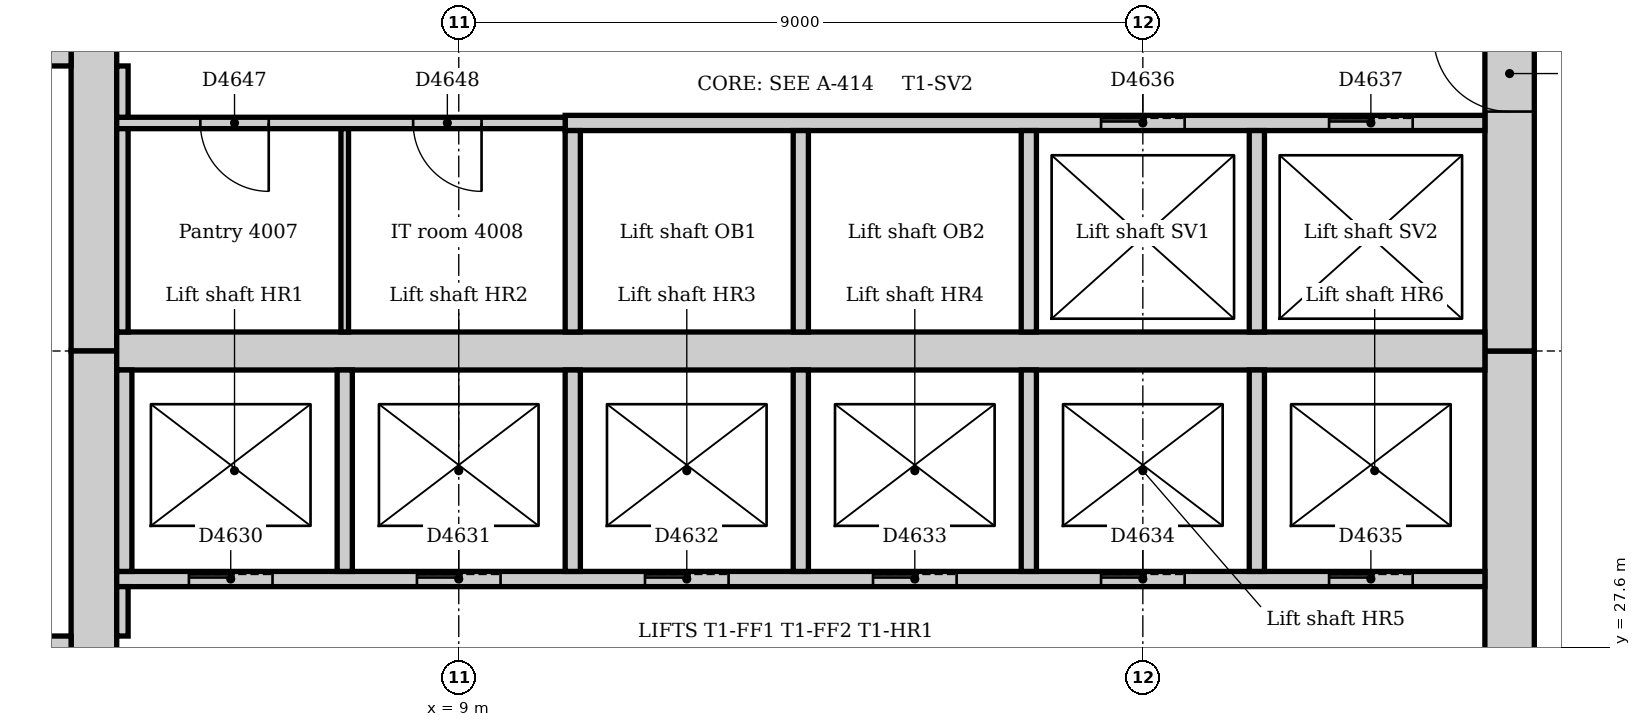
"""IFC4 building model, lengths in metres.
Left out: names, types, materials, properties, quantities, classifications, styles, units other than length and angle.
Written with IfcOpenShell. Run it as: python <this file> out.ifc"""

import sys

from ifc_helpers import new_model, si_unit, direction, frame, frame_2d, origin, place, context, subcontext, project, spatial, rectangle, extrude, element, fill, save


model = new_model("IFC4")
c1 = context("Model", 3, precision=1e-05, world=origin(), true_north=direction((0.0, 1.0)))
c2 = subcontext(c1, "Body", "Model", "MODEL_VIEW")
j1 = project(units=[si_unit("LENGTHUNIT", "METRE"), si_unit("PLANEANGLEUNIT", "RADIAN")], contexts=[c1])
p1 = place(None, origin())
s1 = spatial("IfcSite", under=j1, at=p1, CompositionType="ELEMENT")
p2 = place(p1, origin())
s2 = spatial("IfcBuilding", under=s1, at=p2, CompositionType="ELEMENT")
p3 = place(p2, frame((0.0, 0.0, 169.0)))
s3 = spatial("IfcBuildingStorey", under=s2, at=p3, CompositionType="ELEMENT", Elevation=169.0)
p4 = place(p3, frame((22.825, 21.0, 0.0), z_axis=(0.0, 0.0, 1.0), x_axis=(0.0, 1.0, 0.0)))
e1 = element("IfcWall", 1, at=p4, inside=s3, PredefinedType="SOLIDWALL", context=c2, shape_type="SweptSolid", body=[
    extrude(rectangle(XDim=10.5, YDim=0.65, at=frame_2d((5.25, 0.0))), origin(), (0.0, 0.0, 1.0), 4.0),
])
p5 = place(p4, frame((4.35, 0.0, 0.0)))
e2 = element("IfcOpeningElement", 2, at=p5, cuts=e1, PredefinedType="OPENING", context=c2, shape_type="SweptSolid", body=[
    extrude(rectangle(XDim=1.8, YDim=2.1, at=frame_2d((0.9, 1.05))), frame((0.0, 0.335, 0.0), z_axis=(0.0, -1.0, 0.0), x_axis=(1.0, 0.0, 0.0)), (0.0, 0.0, 1.0), 0.67),
])
p6 = place(p3, frame((22.825, 31.5, 0.0), z_axis=(0.0, 0.0, 1.0), x_axis=(0.0, 1.0, 0.0)))
e3 = element("IfcWall", 3, at=p6, inside=s3, PredefinedType="SOLIDWALL", context=c2, shape_type="SweptSolid", body=[
    extrude(rectangle(XDim=10.5, YDim=0.65, at=frame_2d((5.25, 0.0))), origin(), (0.0, 0.0, 1.0), 4.0),
])
p7 = place(p6, frame((3.15, 0.0, 0.0)))
e4 = element("IfcOpeningElement", 4, at=p7, cuts=e3, PredefinedType="OPENING", context=c2, shape_type="SweptSolid", body=[
    extrude(rectangle(XDim=1.0, YDim=2.1, at=frame_2d((0.5, 1.05))), frame((0.0, 0.335, 0.0), z_axis=(0.0, -1.0, 0.0), x_axis=(1.0, 0.0, 0.0)), (0.0, 0.0, 1.0), 0.67),
])
p8 = place(p6, frame((5.2, 0.0, 0.0)))
e5 = element("IfcOpeningElement", 5, at=p8, cuts=e3, PredefinedType="OPENING", context=c2, shape_type="SweptSolid", body=[
    extrude(rectangle(XDim=1.0, YDim=2.1, at=frame_2d((0.5, 1.05))), frame((0.0, 0.335, 0.0), z_axis=(0.0, -1.0, 0.0), x_axis=(1.0, 0.0, 0.0)), (0.0, 0.0, 1.0), 0.67),
])
p9 = place(p3, frame((4.2, 42.0, 0.0), z_axis=(0.0, 0.0, 1.0), x_axis=(0.0, -1.0, 0.0)))
e6 = element("IfcWall", 6, at=p9, inside=s3, PredefinedType="SOLIDWALL", context=c2, shape_type="SweptSolid", body=[
    extrude(rectangle(XDim=10.5, YDim=0.6, at=frame_2d((5.25, 0.0))), origin(), (0.0, 0.0, 1.0), 4.0),
])
p10 = place(p9, frame((5.3, 0.0, 0.0)))
e7 = element("IfcOpeningElement", 7, at=p10, cuts=e6, PredefinedType="OPENING", context=c2, shape_type="SweptSolid", body=[
    extrude(rectangle(XDim=1.0, YDim=2.1, at=frame_2d((0.5, 1.05))), frame((0.0, 0.31, 0.0), z_axis=(0.0, -1.0, 0.0), x_axis=(1.0, 0.0, 0.0)), (0.0, 0.0, 1.0), 0.62),
])
p11 = place(p3, frame((4.2, 31.5, 0.0), z_axis=(0.0, 0.0, 1.0), x_axis=(0.0, -1.0, 0.0)))
e8 = element("IfcWall", 8, at=p11, inside=s3, PredefinedType="SOLIDWALL", context=c2, shape_type="SweptSolid", body=[
    extrude(rectangle(XDim=10.5, YDim=0.6, at=frame_2d((5.25, 0.0))), origin(), (0.0, 0.0, 1.0), 4.0),
])
p12 = place(p11, frame((4.25, 0.0, 0.0)))
e9 = element("IfcOpeningElement", 9, at=p12, cuts=e8, PredefinedType="OPENING", context=c2, shape_type="SweptSolid", body=[
    extrude(rectangle(XDim=1.0, YDim=2.1, at=frame_2d((0.5, 1.05))), frame((0.0, 0.31, 0.0), z_axis=(0.0, -1.0, 0.0), x_axis=(1.0, 0.0, 0.0)), (0.0, 0.0, 1.0), 0.62),
])
p13 = place(p3, frame((4.5, 31.5, 0.0), z_axis=(0.0, 0.0, 1.0), x_axis=(1.0, 0.0, 0.0)))
e10 = element("IfcWall", 10, at=p13, inside=s3, PredefinedType="SOLIDWALL", context=c2, shape_type="SweptSolid", body=[
    extrude(rectangle(XDim=18.0, YDim=0.5, at=frame_2d((9.0, 0.0))), origin(), (0.0, 0.0, 1.0), 4.0),
])
p14 = place(p3, frame((3.9, 27.625, 0.0), z_axis=(0.0, 0.0, 1.0), x_axis=(-1.0, 0.0, 0.0)))
e11 = element("IfcWall", 11, at=p14, inside=s3, PredefinedType="SOLIDWALL", context=c2, shape_type="SweptSolid", body=[
    extrude(rectangle(XDim=3.54, YDim=0.25, at=frame_2d((1.77, 0.0))), origin(), (0.0, 0.0, 1.0), 4.0),
])
p15 = place(p14, frame((0.4, 0.0, 0.0)))
e12 = element("IfcOpeningElement", 12, at=p15, cuts=e11, PredefinedType="OPENING", context=c2, shape_type="SweptSolid", body=[
    extrude(rectangle(XDim=1.0, YDim=2.1, at=frame_2d((0.5, 1.05))), frame((0.0, 0.135, 0.0), z_axis=(0.0, -1.0, 0.0), x_axis=(1.0, 0.0, 0.0)), (0.0, 0.0, 1.0), 0.27),
])
p16 = place(p3, frame((0.36, 35.375, 0.0), z_axis=(0.0, 0.0, 1.0), x_axis=(1.0, 0.0, 0.0)))
e13 = element("IfcWall", 13, at=p16, inside=s3, PredefinedType="SOLIDWALL", context=c2, shape_type="SweptSolid", body=[
    extrude(rectangle(XDim=3.54, YDim=0.25, at=frame_2d((1.77, 0.0))), origin(), (0.0, 0.0, 1.0), 4.0),
])
p17 = place(p16, frame((2.14, 0.0, 0.0)))
e14 = element("IfcOpeningElement", 14, at=p17, cuts=e13, PredefinedType="OPENING", context=c2, shape_type="SweptSolid", body=[
    extrude(rectangle(XDim=1.0, YDim=2.1, at=frame_2d((0.5, 1.05))), frame((0.0, 0.135, 0.0), z_axis=(0.0, -1.0, 0.0), x_axis=(1.0, 0.0, 0.0)), (0.0, 0.0, 1.0), 0.27),
])
p18 = place(p3, frame((4.5, 28.5, 0.0), z_axis=(0.0, 0.0, 1.0), x_axis=(1.0, 0.0, 0.0)))
e15 = element("IfcWall", 15, at=p18, inside=s3, PredefinedType="PARTITIONING", context=c2, shape_type="SweptSolid", body=[
    extrude(rectangle(XDim=18.0, YDim=0.2, at=frame_2d((9.0, 0.0))), origin(), (0.0, 0.0, 1.0), 3.85),
])
p19 = place(p18, frame((0.95, 0.0, 0.0)))
e16 = element("IfcOpeningElement", 16, at=p19, cuts=e15, PredefinedType="OPENING", context=c2, shape_type="SweptSolid", body=[
    extrude(rectangle(XDim=1.1, YDim=2.1, at=frame_2d((0.55, 1.05))), frame((0.0, 0.11, 0.0), z_axis=(0.0, -1.0, 0.0), x_axis=(1.0, 0.0, 0.0)), (0.0, 0.0, 1.0), 0.22),
])
p20 = place(p18, frame((3.95, 0.0, 0.0)))
e17 = element("IfcOpeningElement", 17, at=p20, cuts=e15, PredefinedType="OPENING", context=c2, shape_type="SweptSolid", body=[
    extrude(rectangle(XDim=1.1, YDim=2.1, at=frame_2d((0.55, 1.05))), frame((0.0, 0.11, 0.0), z_axis=(0.0, -1.0, 0.0), x_axis=(1.0, 0.0, 0.0)), (0.0, 0.0, 1.0), 0.22),
])
p21 = place(p18, frame((6.95, 0.0, 0.0)))
e18 = element("IfcOpeningElement", 18, at=p21, cuts=e15, PredefinedType="OPENING", context=c2, shape_type="SweptSolid", body=[
    extrude(rectangle(XDim=1.1, YDim=2.1, at=frame_2d((0.55, 1.05))), frame((0.0, 0.11, 0.0), z_axis=(0.0, -1.0, 0.0), x_axis=(1.0, 0.0, 0.0)), (0.0, 0.0, 1.0), 0.22),
])
p22 = place(p18, frame((9.95, 0.0, 0.0)))
e19 = element("IfcOpeningElement", 19, at=p22, cuts=e15, PredefinedType="OPENING", context=c2, shape_type="SweptSolid", body=[
    extrude(rectangle(XDim=1.1, YDim=2.1, at=frame_2d((0.55, 1.05))), frame((0.0, 0.11, 0.0), z_axis=(0.0, -1.0, 0.0), x_axis=(1.0, 0.0, 0.0)), (0.0, 0.0, 1.0), 0.22),
])
p23 = place(p18, frame((12.95, 0.0, 0.0)))
e20 = element("IfcOpeningElement", 20, at=p23, cuts=e15, PredefinedType="OPENING", context=c2, shape_type="SweptSolid", body=[
    extrude(rectangle(XDim=1.1, YDim=2.1, at=frame_2d((0.55, 1.05))), frame((0.0, 0.11, 0.0), z_axis=(0.0, -1.0, 0.0), x_axis=(1.0, 0.0, 0.0)), (0.0, 0.0, 1.0), 0.22),
])
p24 = place(p18, frame((15.95, 0.0, 0.0)))
e21 = element("IfcOpeningElement", 21, at=p24, cuts=e15, PredefinedType="OPENING", context=c2, shape_type="SweptSolid", body=[
    extrude(rectangle(XDim=1.1, YDim=2.1, at=frame_2d((0.55, 1.05))), frame((0.0, 0.11, 0.0), z_axis=(0.0, -1.0, 0.0), x_axis=(1.0, 0.0, 0.0)), (0.0, 0.0, 1.0), 0.22),
])
p25 = place(p3, frame((10.4, 34.5, 0.0), z_axis=(0.0, 0.0, 1.0), x_axis=(1.0, 0.0, 0.0)))
e22 = element("IfcWall", 22, at=p25, inside=s3, PredefinedType="PARTITIONING", context=c2, shape_type="SweptSolid", body=[
    extrude(rectangle(XDim=12.1, YDim=0.2, at=frame_2d((6.05, 0.0))), origin(), (0.0, 0.0, 1.0), 3.85),
])
p26 = place(p25, frame((7.05, 0.0, 0.0)))
e23 = element("IfcOpeningElement", 23, at=p26, cuts=e22, PredefinedType="OPENING", context=c2, shape_type="SweptSolid", body=[
    extrude(rectangle(XDim=1.1, YDim=2.1, at=frame_2d((0.55, 1.05))), frame((0.0, 0.11, 0.0), z_axis=(0.0, -1.0, 0.0), x_axis=(1.0, 0.0, 0.0)), (0.0, 0.0, 1.0), 0.22),
])
p27 = place(p25, frame((10.05, 0.0, 0.0)))
e24 = element("IfcOpeningElement", 24, at=p27, cuts=e22, PredefinedType="OPENING", context=c2, shape_type="SweptSolid", body=[
    extrude(rectangle(XDim=1.1, YDim=2.1, at=frame_2d((0.55, 1.05))), frame((0.0, 0.11, 0.0), z_axis=(0.0, -1.0, 0.0), x_axis=(1.0, 0.0, 0.0)), (0.0, 0.0, 1.0), 0.22),
])
for number, where, z_axis, x_axis in (
    (25, (10.5, 28.6, 0.0), (0.0, 0.0, 1.0), (0.0, 1.0, 0.0)),
    (26, (10.5, 31.75, 0.0), (0.0, 0.0, 1.0), (0.0, 1.0, 0.0)),
    (27, (13.5, 28.6, 0.0), (0.0, 0.0, 1.0), (0.0, 1.0, 0.0)),
    (28, (13.5, 31.75, 0.0), (0.0, 0.0, 1.0), (0.0, 1.0, 0.0)),
    (29, (16.5, 28.6, 0.0), (0.0, 0.0, 1.0), (0.0, 1.0, 0.0)),
    (30, (16.5, 31.75, 0.0), (0.0, 0.0, 1.0), (0.0, 1.0, 0.0)),
    (31, (19.5, 28.6, 0.0), (0.0, 0.0, 1.0), (0.0, 1.0, 0.0)),
    (32, (19.5, 31.75, 0.0), (0.0, 0.0, 1.0), (0.0, 1.0, 0.0)),
    (33, (4.6, 28.6, 0.0), (0.0, 0.0, 1.0), (0.0, 1.0, 0.0)),
    (34, (7.5, 28.6, 0.0), (0.0, 0.0, 1.0), (0.0, 1.0, 0.0)),
):
    element("IfcWall", number, at=place(p3, frame(where, z_axis=z_axis, x_axis=x_axis)), inside=s3, PredefinedType="PARTITIONING", context=c2, shape_type="SweptSolid", body=[
        extrude(rectangle(XDim=2.65, YDim=0.2, at=frame_2d((1.325, 0.0))), origin(), (0.0, 0.0, 1.0), 3.85),
    ])
p28 = place(p3, frame((4.5, 34.5, 0.0), z_axis=(0.0, 0.0, 1.0), x_axis=(1.0, 0.0, 0.0)))
e35 = element("IfcWall", 35, at=p28, inside=s3, PredefinedType="PARTITIONING", context=c2, shape_type="SweptSolid", body=[
    extrude(rectangle(XDim=5.9, YDim=0.15, at=frame_2d((2.95, 0.0))), origin(), (0.0, 0.0, 1.0), 3.85),
])
p29 = place(p28, frame((1.1, 0.0, 0.0)))
e36 = element("IfcOpeningElement", 36, at=p29, cuts=e35, PredefinedType="OPENING", context=c2, shape_type="SweptSolid", body=[
    extrude(rectangle(XDim=0.9, YDim=2.1, at=frame_2d((0.45, 1.05))), frame((0.0, 0.085, 0.0), z_axis=(0.0, -1.0, 0.0), x_axis=(1.0, 0.0, 0.0)), (0.0, 0.0, 1.0), 0.17),
])
p30 = place(p28, frame((3.9, 0.0, 0.0)))
e37 = element("IfcOpeningElement", 37, at=p30, cuts=e35, PredefinedType="OPENING", context=c2, shape_type="SweptSolid", body=[
    extrude(rectangle(XDim=0.9, YDim=2.1, at=frame_2d((0.45, 1.05))), frame((0.0, 0.085, 0.0), z_axis=(0.0, -1.0, 0.0), x_axis=(1.0, 0.0, 0.0)), (0.0, 0.0, 1.0), 0.17),
])
p31 = place(p3, frame((4.575, 34.575, 0.0), z_axis=(0.0, 0.0, 1.0), x_axis=(0.0, 1.0, 0.0)))
e38 = element("IfcWall", 38, at=p31, inside=s3, PredefinedType="PARTITIONING", context=c2, shape_type="SweptSolid", body=[
    extrude(rectangle(XDim=0.675, YDim=0.15, at=frame_2d((0.338, 0.0))), origin(), (0.0, 0.0, 1.0), 3.85),
])
p32 = place(p3, frame((4.575, 31.75, 0.0), z_axis=(0.0, 0.0, 1.0), x_axis=(0.0, 1.0, 0.0)))
e39 = element("IfcWall", 39, at=p32, inside=s3, PredefinedType="PARTITIONING", context=c2, shape_type="SweptSolid", body=[
    extrude(rectangle(XDim=2.675, YDim=0.15, at=frame_2d((1.337, 0.0))), origin(), (0.0, 0.0, 1.0), 3.85),
])
p33 = place(p3, frame((4.575, 27.75, 0.0), z_axis=(0.0, 0.0, 1.0), x_axis=(0.0, 1.0, 0.0)))
e40 = element("IfcWall", 40, at=p33, inside=s3, PredefinedType="PARTITIONING", context=c2, shape_type="SweptSolid", body=[
    extrude(rectangle(XDim=0.65, YDim=0.15, at=frame_2d((0.325, 0.0))), origin(), (0.0, 0.0, 1.0), 3.85),
])
p34 = place(p3, frame((7.5, 31.75, 0.0), z_axis=(0.0, 0.0, 1.0), x_axis=(0.0, 1.0, 0.0)))
e41 = element("IfcWall", 41, at=p34, inside=s3, PredefinedType="PARTITIONING", context=c2, shape_type="SweptSolid", body=[
    extrude(rectangle(XDim=2.675, YDim=0.1, at=frame_2d((1.337, 0.0))), origin(), (0.0, 0.0, 1.0), 3.85),
])
p35 = place(p19, origin())
e42 = element("IfcDoor", 42, at=p35, inside=s3, OperationType="SLIDING_TO_LEFT", PredefinedType="DOOR", context=c2, shape_type="SweptSolid", body=[
    extrude(rectangle(XDim=1.1, YDim=2.1, at=frame_2d((0.55, 1.05))), frame((0.0, 0.025, 0.0), z_axis=(0.0, -1.0, 0.0), x_axis=(1.0, 0.0, 0.0)), (0.0, 0.0, 1.0), 0.05),
])
fill(e16, e42)
p36 = place(p20, origin())
e43 = element("IfcDoor", 43, at=p36, inside=s3, OperationType="SLIDING_TO_LEFT", PredefinedType="DOOR", context=c2, shape_type="SweptSolid", body=[
    extrude(rectangle(XDim=1.1, YDim=2.1, at=frame_2d((0.55, 1.05))), frame((0.0, 0.025, 0.0), z_axis=(0.0, -1.0, 0.0), x_axis=(1.0, 0.0, 0.0)), (0.0, 0.0, 1.0), 0.05),
])
fill(e17, e43)
p37 = place(p21, origin())
e44 = element("IfcDoor", 44, at=p37, inside=s3, OperationType="SLIDING_TO_LEFT", PredefinedType="DOOR", context=c2, shape_type="SweptSolid", body=[
    extrude(rectangle(XDim=1.1, YDim=2.1, at=frame_2d((0.55, 1.05))), frame((0.0, 0.025, 0.0), z_axis=(0.0, -1.0, 0.0), x_axis=(1.0, 0.0, 0.0)), (0.0, 0.0, 1.0), 0.05),
])
fill(e18, e44)
p38 = place(p22, origin())
e45 = element("IfcDoor", 45, at=p38, inside=s3, OperationType="SLIDING_TO_LEFT", PredefinedType="DOOR", context=c2, shape_type="SweptSolid", body=[
    extrude(rectangle(XDim=1.1, YDim=2.1, at=frame_2d((0.55, 1.05))), frame((0.0, 0.025, 0.0), z_axis=(0.0, -1.0, 0.0), x_axis=(1.0, 0.0, 0.0)), (0.0, 0.0, 1.0), 0.05),
])
fill(e19, e45)
p39 = place(p23, origin())
e46 = element("IfcDoor", 46, at=p39, inside=s3, OperationType="SLIDING_TO_LEFT", PredefinedType="DOOR", context=c2, shape_type="SweptSolid", body=[
    extrude(rectangle(XDim=1.1, YDim=2.1, at=frame_2d((0.55, 1.05))), frame((0.0, 0.025, 0.0), z_axis=(0.0, -1.0, 0.0), x_axis=(1.0, 0.0, 0.0)), (0.0, 0.0, 1.0), 0.05),
])
fill(e20, e46)
p40 = place(p24, origin())
e47 = element("IfcDoor", 47, at=p40, inside=s3, OperationType="SLIDING_TO_LEFT", PredefinedType="DOOR", context=c2, shape_type="SweptSolid", body=[
    extrude(rectangle(XDim=1.1, YDim=2.1, at=frame_2d((0.55, 1.05))), frame((0.0, 0.025, 0.0), z_axis=(0.0, -1.0, 0.0), x_axis=(1.0, 0.0, 0.0)), (0.0, 0.0, 1.0), 0.05),
])
fill(e21, e47)
p41 = place(p26, origin())
e48 = element("IfcDoor", 48, at=p41, inside=s3, OperationType="SLIDING_TO_LEFT", PredefinedType="DOOR", context=c2, shape_type="SweptSolid", body=[
    extrude(rectangle(XDim=1.1, YDim=2.1, at=frame_2d((0.55, 1.05))), frame((0.0, 0.025, 0.0), z_axis=(0.0, -1.0, 0.0), x_axis=(1.0, 0.0, 0.0)), (0.0, 0.0, 1.0), 0.05),
])
fill(e23, e48)
p42 = place(p27, origin())
e49 = element("IfcDoor", 49, at=p42, inside=s3, OperationType="SLIDING_TO_LEFT", PredefinedType="DOOR", context=c2, shape_type="SweptSolid", body=[
    extrude(rectangle(XDim=1.1, YDim=2.1, at=frame_2d((0.55, 1.05))), frame((0.0, 0.025, 0.0), z_axis=(0.0, -1.0, 0.0), x_axis=(1.0, 0.0, 0.0)), (0.0, 0.0, 1.0), 0.05),
])
fill(e24, e49)
p43 = place(p7, origin())
e50 = element("IfcDoor", 50, at=p43, inside=s3, OperationType="SINGLE_SWING_RIGHT", PredefinedType="DOOR", context=c2, shape_type="SweptSolid", body=[
    extrude(rectangle(XDim=1.0, YDim=2.1, at=frame_2d((0.5, 1.05))), frame((0.0, 0.025, 0.0), z_axis=(0.0, -1.0, 0.0), x_axis=(1.0, 0.0, 0.0)), (0.0, 0.0, 1.0), 0.05),
])
fill(e4, e50)
p44 = place(p29, frame((0.9, 0.0, 0.0), z_axis=(0.0, 0.0, 1.0), x_axis=(-1.0, 0.0, 0.0)))
e51 = element("IfcDoor", 51, at=p44, inside=s3, OperationType="SINGLE_SWING_LEFT", PredefinedType="DOOR", context=c2, shape_type="SweptSolid", body=[
    extrude(rectangle(XDim=0.9, YDim=2.1, at=frame_2d((0.45, 1.05))), frame((0.0, 0.025, 0.0), z_axis=(0.0, -1.0, 0.0), x_axis=(1.0, 0.0, 0.0)), (0.0, 0.0, 1.0), 0.05),
])
fill(e36, e51)
p45 = place(p30, frame((0.9, 0.0, 0.0), z_axis=(0.0, 0.0, 1.0), x_axis=(-1.0, 0.0, 0.0)))
e52 = element("IfcDoor", 52, at=p45, inside=s3, OperationType="SINGLE_SWING_LEFT", PredefinedType="DOOR", context=c2, shape_type="SweptSolid", body=[
    extrude(rectangle(XDim=0.9, YDim=2.1, at=frame_2d((0.45, 1.05))), frame((0.0, 0.025, 0.0), z_axis=(0.0, -1.0, 0.0), x_axis=(1.0, 0.0, 0.0)), (0.0, 0.0, 1.0), 0.05),
])
fill(e37, e52)
save(model, sys.argv[1])
